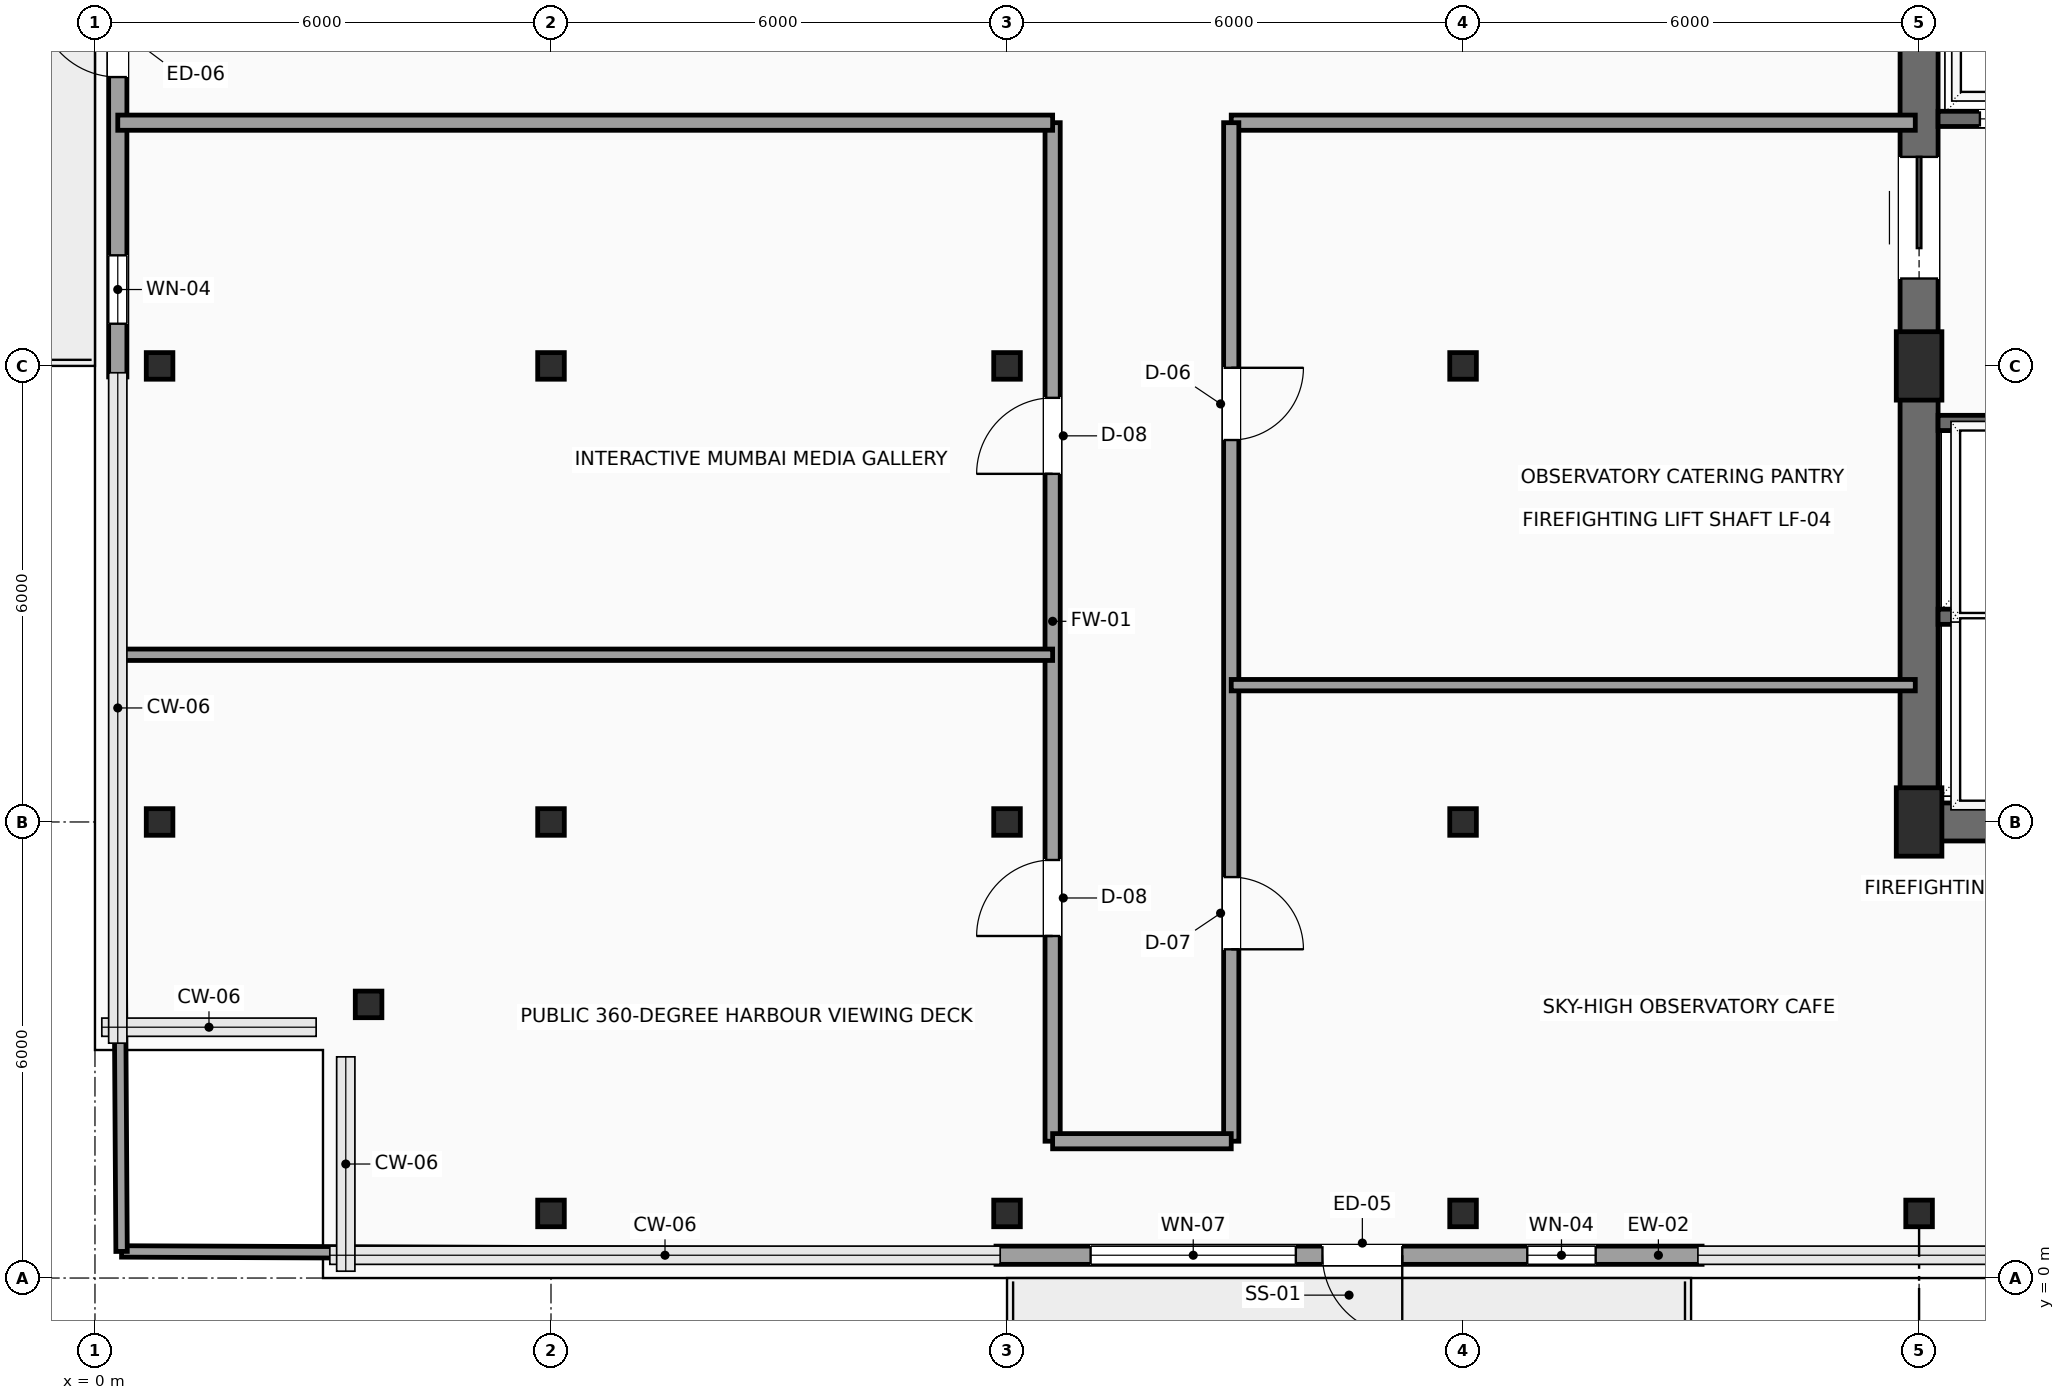
"""IFC4 building model, lengths in metres.
Left out: names, types, materials, properties, quantities, classifications, styles, units other than length and angle.
Written with IfcOpenShell. Run it as: python <this file> out.ifc"""

import sys

from ifc_helpers import new_model, si_unit, direction, frame, frame_2d, origin, origin_2d, place, context, subcontext, project, spatial, rectangle, hollow_rectangle, extrude, element, fill, save


model = new_model("IFC4")
c1 = context("Model", 3, precision=1e-05, world=origin(), true_north=direction((0.0, 1.0)))
c2 = subcontext(c1, "Body", "Model", "MODEL_VIEW")
j1 = project(units=[si_unit("LENGTHUNIT", "METRE"), si_unit("PLANEANGLEUNIT", "RADIAN")], contexts=[c1])
p1 = place(None, origin())
s1 = spatial("IfcSite", under=j1, at=p1, CompositionType="ELEMENT")
p2 = place(p1, origin())
s2 = spatial("IfcBuilding", under=s1, at=p2, CompositionType="ELEMENT")
p3 = place(p2, frame((0.0, 0.0, 296.4)))
s3 = spatial("IfcBuildingStorey", under=s2, at=p3, CompositionType="ELEMENT", Elevation=296.4)
for number, where, z_axis, x_axis in (
    (1, (24.0, 6.0, 0.0), (0.0, 0.0, 1.0), (1.0, 0.0, 0.0)),
    (2, (24.0, 12.0, 0.0), (0.0, 0.0, 1.0), (1.0, 0.0, 0.0)),
):
    element("IfcColumn", number, at=place(p3, frame(where, z_axis=z_axis, x_axis=x_axis)), inside=s3, PredefinedType="COLUMN", context=c2, shape_type="SweptSolid", body=[
        extrude(rectangle(XDim=0.6, YDim=0.9, at=origin_2d()), origin(), (0.0, 0.0, 1.0), 4.5),
    ])
for number, where, z_axis, x_axis in (
    (3, (3.6, 3.6, 0.0), (0.0, 0.0, 1.0), (1.0, 0.0, 0.0)),
    (4, (0.85, 6.0, 0.0), (0.0, 0.0, 1.0), (1.0, 0.0, 0.0)),
    (5, (0.85, 12.0, 0.0), (0.0, 0.0, 1.0), (1.0, 0.0, 0.0)),
    (6, (6.0, 0.85, 0.0), (0.0, 0.0, 1.0), (1.0, 0.0, 0.0)),
    (7, (6.0, 6.0, 0.0), (0.0, 0.0, 1.0), (1.0, 0.0, 0.0)),
    (8, (6.0, 12.0, 0.0), (0.0, 0.0, 1.0), (1.0, 0.0, 0.0)),
    (9, (12.0, 0.85, 0.0), (0.0, 0.0, 1.0), (1.0, 0.0, 0.0)),
    (10, (12.0, 6.0, 0.0), (0.0, 0.0, 1.0), (1.0, 0.0, 0.0)),
    (11, (12.0, 12.0, 0.0), (0.0, 0.0, 1.0), (1.0, 0.0, 0.0)),
    (12, (18.0, 0.85, 0.0), (0.0, 0.0, 1.0), (1.0, 0.0, 0.0)),
    (13, (18.0, 6.0, 0.0), (0.0, 0.0, 1.0), (1.0, 0.0, 0.0)),
    (14, (18.0, 12.0, 0.0), (0.0, 0.0, 1.0), (1.0, 0.0, 0.0)),
    (15, (24.0, 0.85, 0.0), (0.0, 0.0, 1.0), (1.0, 0.0, 0.0)),
):
    element("IfcColumn", number, at=place(p3, frame(where, z_axis=z_axis, x_axis=x_axis)), inside=s3, PredefinedType="COLUMN", context=c2, shape_type="SweptSolid", body=[
        extrude(hollow_rectangle(XDim=0.35, YDim=0.35, WallThickness=0.016, InnerFilletRadius=0.016, OuterFilletRadius=0.032, at=origin_2d()), origin(), (0.0, 0.0, 1.0), 4.5),
    ])
p4 = place(p3, frame((21.145, 0.3, 0.0), z_axis=(0.0, 0.0, 1.0), x_axis=(-1.0, 0.0, 0.0)))
e16 = element("IfcWall", 16, at=p4, inside=s3, PredefinedType="SOLIDWALL", context=c2, shape_type="SweptSolid", body=[
    extrude(rectangle(XDim=9.29, YDim=0.24, at=frame_2d((4.645, 0.0))), origin(), (0.0, 0.0, 1.0), 4.225),
])
p5 = place(p4, frame((3.945, 0.0, 0.0)))
e17 = element("IfcOpeningElement", 17, at=p5, cuts=e16, PredefinedType="OPENING", context=c2, shape_type="SweptSolid", body=[
    extrude(rectangle(XDim=1.05, YDim=2.2, at=frame_2d((0.525, 1.1))), frame((0.0, 0.13, 0.0), z_axis=(0.0, -1.0, 0.0), x_axis=(1.0, 0.0, 0.0)), (0.0, 0.0, 1.0), 0.26),
])
p6 = place(p4, frame((5.345, 0.0, 0.6)))
e18 = element("IfcOpeningElement", 18, at=p6, cuts=e16, PredefinedType="OPENING", context=c2, shape_type="SweptSolid", body=[
    extrude(rectangle(XDim=2.7, YDim=2.3, at=frame_2d((1.35, 1.15))), frame((0.0, 0.13, 0.0), z_axis=(0.0, -1.0, 0.0), x_axis=(1.0, 0.0, 0.0)), (0.0, 0.0, 1.0), 0.26),
])
p7 = place(p4, frame((1.4, 0.0, 0.6)))
e19 = element("IfcOpeningElement", 19, at=p7, cuts=e16, PredefinedType="OPENING", context=c2, shape_type="SweptSolid", body=[
    extrude(rectangle(XDim=0.9, YDim=2.2, at=frame_2d((0.45, 1.1))), frame((0.0, 0.13, 0.0), z_axis=(0.0, -1.0, 0.0), x_axis=(1.0, 0.0, 0.0)), (0.0, 0.0, 1.0), 0.26),
])
p8 = place(p3, frame((0.3, 11.855, 0.0), z_axis=(0.0, 0.0, 1.0), x_axis=(0.0, 1.0, 0.0)))
e20 = element("IfcWall", 20, at=p8, inside=s3, PredefinedType="SOLIDWALL", context=c2, shape_type="SweptSolid", body=[
    extrude(rectangle(XDim=9.29, YDim=0.24, at=frame_2d((4.645, 0.0))), origin(), (0.0, 0.0, 1.0), 4.225),
])
p9 = place(p8, frame((3.945, 0.0, 0.0)))
e21 = element("IfcOpeningElement", 21, at=p9, cuts=e20, PredefinedType="OPENING", context=c2, shape_type="SweptSolid", body=[
    extrude(rectangle(XDim=1.05, YDim=2.2, at=frame_2d((0.525, 1.1))), frame((0.0, 0.13, 0.0), z_axis=(0.0, -1.0, 0.0), x_axis=(1.0, 0.0, 0.0)), (0.0, 0.0, 1.0), 0.26),
])
p10 = place(p8, frame((6.2, 0.0, 0.6)))
e22 = element("IfcOpeningElement", 22, at=p10, cuts=e20, PredefinedType="OPENING", context=c2, shape_type="SweptSolid", body=[
    extrude(rectangle(XDim=2.7, YDim=2.3, at=frame_2d((1.35, 1.15))), frame((0.0, 0.13, 0.0), z_axis=(0.0, -1.0, 0.0), x_axis=(1.0, 0.0, 0.0)), (0.0, 0.0, 1.0), 0.26),
])
p11 = place(p8, frame((0.7, 0.0, 0.6)))
e23 = element("IfcOpeningElement", 23, at=p11, cuts=e20, PredefinedType="OPENING", context=c2, shape_type="SweptSolid", body=[
    extrude(rectangle(XDim=0.9, YDim=2.2, at=frame_2d((0.45, 1.1))), frame((0.0, 0.13, 0.0), z_axis=(0.0, -1.0, 0.0), x_axis=(1.0, 0.0, 0.0)), (0.0, 0.0, 1.0), 0.26),
])
p12 = place(p3, frame((24.0, 6.0, 0.0), z_axis=(0.0, 0.0, 1.0), x_axis=(1.0, 0.0, 0.0)))
e24 = element("IfcWall", 24, at=p12, inside=s3, PredefinedType="SHEAR", context=c2, shape_type="SweptSolid", body=[
    extrude(rectangle(XDim=9.6, YDim=0.5, at=frame_2d((4.8, 0.0))), origin(), (0.0, 0.0, 1.0), 4.225),
])
p13 = place(p3, frame((24.0, 6.0, 0.0), z_axis=(0.0, 0.0, 1.0), x_axis=(0.0, 1.0, 0.0)))
e25 = element("IfcWall", 25, at=p13, inside=s3, PredefinedType="SHEAR", context=c2, shape_type="SweptSolid", body=[
    extrude(rectangle(XDim=12.0, YDim=0.5, at=frame_2d((6.0, 0.0))), origin(), (0.0, 0.0, 1.0), 4.225),
])
p14 = place(p13, frame((7.15, 0.0, 0.0)))
e26 = element("IfcOpeningElement", 26, at=p14, cuts=e25, PredefinedType="OPENING", context=c2, shape_type="SweptSolid", body=[
    extrude(rectangle(XDim=1.6, YDim=2.3, at=frame_2d((0.8, 1.15))), frame((0.0, 0.26, 0.0), z_axis=(0.0, -1.0, 0.0), x_axis=(1.0, 0.0, 0.0)), (0.0, 0.0, 1.0), 0.52),
])
for number, where, z_axis, x_axis in (
    (27, (24.25, 8.7, 0.0), (0.0, 0.0, 1.0), (1.0, 0.0, 0.0)),
    (28, (24.25, 11.25, 0.0), (0.0, 0.0, 1.0), (1.0, 0.0, 0.0)),
):
    element("IfcWall", number, at=place(p3, frame(where, z_axis=z_axis, x_axis=x_axis)), inside=s3, PredefinedType="SHEAR", context=c2, shape_type="SweptSolid", body=[
        extrude(rectangle(XDim=2.17, YDim=0.2, at=frame_2d((1.085, 0.0))), origin(), (0.0, 0.0, 1.0), 4.225),
    ])
p15 = place(p3, frame((24.25, 15.25, 0.0), z_axis=(0.0, 0.0, 1.0), x_axis=(1.0, 0.0, 0.0)))
e29 = element("IfcWall", 29, at=p15, inside=s3, PredefinedType="SHEAR", context=c2, shape_type="SweptSolid", body=[
    extrude(rectangle(XDim=5.2, YDim=0.2, at=frame_2d((2.6, 0.0))), origin(), (0.0, 0.0, 1.0), 4.225),
])
p16 = place(p15, frame((0.55, 0.0, 0.0)))
e30 = element("IfcOpeningElement", 30, at=p16, cuts=e29, PredefinedType="OPENING", context=c2, shape_type="SweptSolid", body=[
    extrude(rectangle(XDim=1.2, YDim=2.2, at=frame_2d((0.6, 1.1))), frame((0.0, 0.11, 0.0), z_axis=(0.0, -1.0, 0.0), x_axis=(1.0, 0.0, 0.0)), (0.0, 0.0, 1.0), 0.22),
])
p17 = place(p15, frame((3.15, 0.0, 0.0)))
e31 = element("IfcOpeningElement", 31, at=p17, cuts=e29, PredefinedType="OPENING", context=c2, shape_type="SweptSolid", body=[
    extrude(rectangle(XDim=1.2, YDim=2.2, at=frame_2d((0.6, 1.1))), frame((0.0, 0.11, 0.0), z_axis=(0.0, -1.0, 0.0), x_axis=(1.0, 0.0, 0.0)), (0.0, 0.0, 1.0), 0.22),
])
p18 = place(p3, frame((12.6, 1.8, 0.0), z_axis=(0.0, 0.0, 1.0), x_axis=(0.0, 1.0, 0.0)))
e32 = element("IfcWall", 32, at=p18, inside=s3, PredefinedType="SOLIDWALL", context=c2, shape_type="SweptSolid", body=[
    extrude(rectangle(XDim=13.4, YDim=0.2, at=frame_2d((6.7, 0.0))), origin(), (0.0, 0.0, 1.0), 4.225),
])
p19 = place(p18, frame((2.7, 0.0, 0.0)))
e33 = element("IfcOpeningElement", 33, at=p19, cuts=e32, PredefinedType="OPENING", context=c2, shape_type="SweptSolid", body=[
    extrude(rectangle(XDim=1.0, YDim=2.2, at=frame_2d((0.5, 1.1))), frame((0.0, 0.11, 0.0), z_axis=(0.0, -1.0, 0.0), x_axis=(1.0, 0.0, 0.0)), (0.0, 0.0, 1.0), 0.22),
])
p20 = place(p18, frame((8.78, 0.0, 0.0)))
e34 = element("IfcOpeningElement", 34, at=p20, cuts=e32, PredefinedType="OPENING", context=c2, shape_type="SweptSolid", body=[
    extrude(rectangle(XDim=1.0, YDim=2.2, at=frame_2d((0.5, 1.1))), frame((0.0, 0.11, 0.0), z_axis=(0.0, -1.0, 0.0), x_axis=(1.0, 0.0, 0.0)), (0.0, 0.0, 1.0), 0.22),
])
p21 = place(p3, frame((12.6, 15.2, 0.0), z_axis=(0.0, 0.0, 1.0), x_axis=(-1.0, 0.0, 0.0)))
e35 = element("IfcWall", 35, at=p21, inside=s3, PredefinedType="SOLIDWALL", context=c2, shape_type="SweptSolid", body=[
    extrude(rectangle(XDim=12.3, YDim=0.2, at=frame_2d((6.15, 0.0))), origin(), (0.0, 0.0, 1.0), 3.857),
])
p22 = place(p3, frame((23.95, 15.2, 0.0), z_axis=(0.0, 0.0, 1.0), x_axis=(-1.0, 0.0, 0.0)))
e36 = element("IfcWall", 36, at=p22, inside=s3, PredefinedType="SOLIDWALL", context=c2, shape_type="SweptSolid", body=[
    extrude(rectangle(XDim=9.0, YDim=0.2, at=frame_2d((4.5, 0.0))), origin(), (0.0, 0.0, 1.0), 3.857),
])
p23 = place(p3, frame((14.95, 15.2, 0.0), z_axis=(0.0, 0.0, 1.0), x_axis=(0.0, -1.0, 0.0)))
e37 = element("IfcWall", 37, at=p23, inside=s3, PredefinedType="SOLIDWALL", context=c2, shape_type="SweptSolid", body=[
    extrude(rectangle(XDim=13.4, YDim=0.2, at=frame_2d((6.7, 0.0))), origin(), (0.0, 0.0, 1.0), 4.225),
])
p24 = place(p23, frame((9.925, 0.0, 0.0)))
e38 = element("IfcOpeningElement", 38, at=p24, cuts=e37, PredefinedType="OPENING", context=c2, shape_type="SweptSolid", body=[
    extrude(rectangle(XDim=0.95, YDim=2.15, at=frame_2d((0.475, 1.075))), frame((0.0, 0.11, 0.0), z_axis=(0.0, -1.0, 0.0), x_axis=(1.0, 0.0, 0.0)), (0.0, 0.0, 1.0), 0.22),
])
p25 = place(p23, frame((3.225, 0.0, 0.0)))
e39 = element("IfcOpeningElement", 39, at=p25, cuts=e37, PredefinedType="OPENING", context=c2, shape_type="SweptSolid", body=[
    extrude(rectangle(XDim=0.95, YDim=2.15, at=frame_2d((0.475, 1.075))), frame((0.0, 0.11, 0.0), z_axis=(0.0, -1.0, 0.0), x_axis=(1.0, 0.0, 0.0)), (0.0, 0.0, 1.0), 0.22),
])
p26 = place(p3, frame((14.95, 1.8, 0.0), z_axis=(0.0, 0.0, 1.0), x_axis=(-1.0, 0.0, 0.0)))
e40 = element("IfcWall", 40, at=p26, inside=s3, PredefinedType="SOLIDWALL", context=c2, shape_type="SweptSolid", body=[
    extrude(rectangle(XDim=2.35, YDim=0.2, at=frame_2d((1.175, 0.0))), origin(), (0.0, 0.0, 1.0), 4.225),
])
p27 = place(p3, frame((0.35, 0.35, 0.0), z_axis=(0.0, 0.0, 1.0), x_axis=(0.999991613227, -0.004095543276, 0.0)))
e41 = element("IfcWall", 41, at=p27, inside=s3, PredefinedType="PARTITIONING", context=c2, shape_type="SweptSolid", body=[
    extrude(rectangle(XDim=11.505, YDim=0.15, at=frame_2d((5.752, 0.0))), origin(), (0.0, 0.0, 1.0), 4.225),
])
p28 = place(p3, frame((0.3, 8.2, 0.0), z_axis=(0.0, 0.0, 1.0), x_axis=(1.0, 0.0, 0.0)))
e42 = element("IfcWall", 42, at=p28, inside=s3, PredefinedType="PARTITIONING", context=c2, shape_type="SweptSolid", body=[
    extrude(rectangle(XDim=12.3, YDim=0.15, at=frame_2d((6.15, 0.0))), origin(), (0.0, 0.0, 1.0), 4.225),
])
p29 = place(p3, frame((0.35, 0.35, 0.0), z_axis=(0.0, 0.0, 1.0), x_axis=(-0.006375636285, 0.999979675424, 0.0)))
e43 = element("IfcWall", 43, at=p29, inside=s3, PredefinedType="PARTITIONING", context=c2, shape_type="SweptSolid", body=[
    extrude(rectangle(XDim=7.85, YDim=0.15, at=frame_2d((3.925, 0.0))), origin(), (0.0, 0.0, 1.0), 4.225),
])
p30 = place(p3, frame((14.95, 7.8, 0.0), z_axis=(0.0, 0.0, 1.0), x_axis=(1.0, 0.0, 0.0)))
e44 = element("IfcWall", 44, at=p30, inside=s3, PredefinedType="PARTITIONING", context=c2, shape_type="SweptSolid", body=[
    extrude(rectangle(XDim=9.0, YDim=0.15, at=frame_2d((4.5, 0.0))), origin(), (0.0, 0.0, 1.0), 4.225),
])
p31 = place(p5, origin())
e45 = element("IfcDoor", 45, at=p31, inside=s3, OperationType="SINGLE_SWING_LEFT", PredefinedType="DOOR", context=c2, shape_type="SweptSolid", body=[
    extrude(rectangle(XDim=1.05, YDim=2.2, at=frame_2d((0.525, 1.1))), frame((0.0, 0.025, 0.0), z_axis=(0.0, -1.0, 0.0), x_axis=(1.0, 0.0, 0.0)), (0.0, 0.0, 1.0), 0.05),
])
fill(e17, e45)
p32 = place(p6, origin())
e46 = element("IfcWindow", 46, at=p32, inside=s3, PartitioningType="SINGLE_PANEL", PredefinedType="WINDOW", context=c2, shape_type="SweptSolid", body=[
    extrude(rectangle(XDim=2.7, YDim=2.3, at=frame_2d((1.35, 1.15))), frame((0.0, 0.03, 0.0), z_axis=(0.0, -1.0, 0.0), x_axis=(1.0, 0.0, 0.0)), (0.0, 0.0, 1.0), 0.06),
])
fill(e18, e46)
p33 = place(p7, origin())
e47 = element("IfcWindow", 47, at=p33, inside=s3, PartitioningType="SINGLE_PANEL", PredefinedType="WINDOW", context=c2, shape_type="SweptSolid", body=[
    extrude(rectangle(XDim=0.9, YDim=2.2, at=frame_2d((0.45, 1.1))), frame((0.0, 0.03, 0.0), z_axis=(0.0, -1.0, 0.0), x_axis=(1.0, 0.0, 0.0)), (0.0, 0.0, 1.0), 0.06),
])
fill(e19, e47)
p34 = place(p9, origin())
e48 = element("IfcDoor", 48, at=p34, inside=s3, OperationType="SINGLE_SWING_RIGHT", PredefinedType="DOOR", context=c2, shape_type="SweptSolid", body=[
    extrude(rectangle(XDim=1.05, YDim=2.2, at=frame_2d((0.525, 1.1))), frame((0.0, 0.025, 0.0), z_axis=(0.0, -1.0, 0.0), x_axis=(1.0, 0.0, 0.0)), (0.0, 0.0, 1.0), 0.05),
])
fill(e21, e48)
p35 = place(p11, origin())
e49 = element("IfcWindow", 49, at=p35, inside=s3, PartitioningType="SINGLE_PANEL", PredefinedType="WINDOW", context=c2, shape_type="SweptSolid", body=[
    extrude(rectangle(XDim=0.9, YDim=2.2, at=frame_2d((0.45, 1.1))), frame((0.0, 0.03, 0.0), z_axis=(0.0, -1.0, 0.0), x_axis=(1.0, 0.0, 0.0)), (0.0, 0.0, 1.0), 0.06),
])
fill(e23, e49)
p36 = place(p14, origin())
e50 = element("IfcDoor", 50, at=p36, inside=s3, OperationType="DOUBLE_DOOR_SLIDING", PredefinedType="DOOR", context=c2, shape_type="SweptSolid", body=[
    extrude(rectangle(XDim=1.6, YDim=2.3, at=frame_2d((0.8, 1.15))), frame((0.0, 0.025, 0.0), z_axis=(0.0, -1.0, 0.0), x_axis=(1.0, 0.0, 0.0)), (0.0, 0.0, 1.0), 0.05),
])
fill(e26, e50)
p37 = place(p16, origin())
e51 = element("IfcDoor", 51, at=p37, inside=s3, OperationType="SLIDING_TO_RIGHT", PredefinedType="DOOR", context=c2, shape_type="SweptSolid", body=[
    extrude(rectangle(XDim=1.2, YDim=2.2, at=frame_2d((0.6, 1.1))), frame((0.0, 0.025, 0.0), z_axis=(0.0, -1.0, 0.0), x_axis=(1.0, 0.0, 0.0)), (0.0, 0.0, 1.0), 0.05),
])
fill(e30, e51)
p38 = place(p19, origin())
e52 = element("IfcDoor", 52, at=p38, inside=s3, OperationType="SINGLE_SWING_LEFT", PredefinedType="DOOR", context=c2, shape_type="SweptSolid", body=[
    extrude(rectangle(XDim=1.0, YDim=2.2, at=frame_2d((0.5, 1.1))), frame((0.0, 0.025, 0.0), z_axis=(0.0, -1.0, 0.0), x_axis=(1.0, 0.0, 0.0)), (0.0, 0.0, 1.0), 0.05),
])
fill(e33, e52)
p39 = place(p20, origin())
e53 = element("IfcDoor", 53, at=p39, inside=s3, OperationType="SINGLE_SWING_LEFT", PredefinedType="DOOR", context=c2, shape_type="SweptSolid", body=[
    extrude(rectangle(XDim=1.0, YDim=2.2, at=frame_2d((0.5, 1.1))), frame((0.0, 0.025, 0.0), z_axis=(0.0, -1.0, 0.0), x_axis=(1.0, 0.0, 0.0)), (0.0, 0.0, 1.0), 0.05),
])
fill(e34, e53)
p40 = place(p24, origin())
e54 = element("IfcDoor", 54, at=p40, inside=s3, OperationType="SINGLE_SWING_RIGHT", PredefinedType="DOOR", context=c2, shape_type="SweptSolid", body=[
    extrude(rectangle(XDim=0.95, YDim=2.15, at=frame_2d((0.475, 1.075))), frame((0.0, 0.025, 0.0), z_axis=(0.0, -1.0, 0.0), x_axis=(1.0, 0.0, 0.0)), (0.0, 0.0, 1.0), 0.05),
])
fill(e38, e54)
p41 = place(p25, origin())
e55 = element("IfcDoor", 55, at=p41, inside=s3, OperationType="SINGLE_SWING_LEFT", PredefinedType="DOOR", context=c2, shape_type="SweptSolid", body=[
    extrude(rectangle(XDim=0.95, YDim=2.15, at=frame_2d((0.475, 1.075))), frame((0.0, 0.025, 0.0), z_axis=(0.0, -1.0, 0.0), x_axis=(1.0, 0.0, 0.0)), (0.0, 0.0, 1.0), 0.05),
])
fill(e39, e55)
save(model, sys.argv[1])
